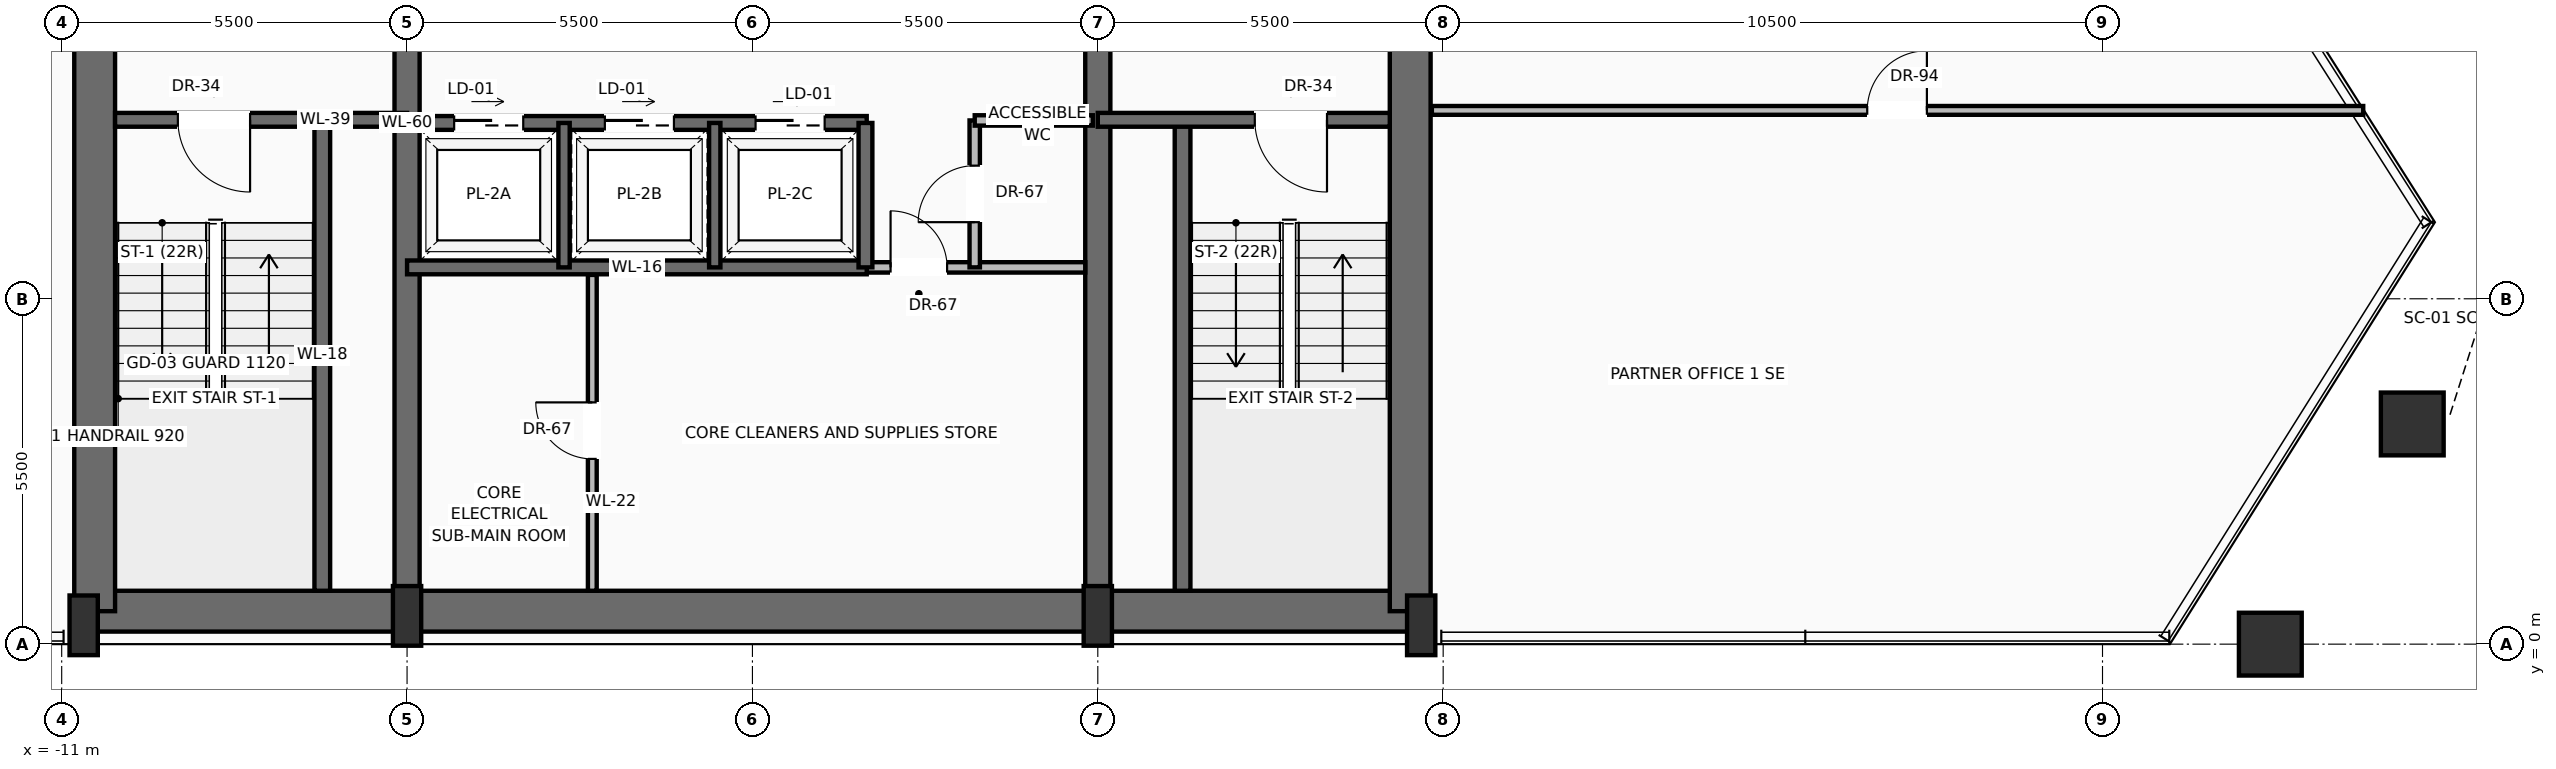
"""IFC4 building model, lengths in metres.
Left out: names, types, materials, properties, quantities, classifications, styles, units other than length and angle.
Written with IfcOpenShell. Run it as: python <this file> out.ifc"""

import sys

from ifc_helpers import new_model, si_unit, direction, frame, frame_2d, origin, origin_2d, place, context, subcontext, project, spatial, rectangle, hollow_rectangle, extrude, source, transform, mapped, element, fill, save


model = new_model("IFC4")
c1 = context("Model", 3, precision=1e-05, world=origin(), true_north=direction((0.0, 1.0)))
c2 = subcontext(c1, "Body", "Model", "MODEL_VIEW")
j1 = project(units=[si_unit("LENGTHUNIT", "METRE"), si_unit("PLANEANGLEUNIT", "RADIAN")], contexts=[c1])
p1 = place(None, origin())
s1 = spatial("IfcSite", under=j1, at=p1, CompositionType="ELEMENT")
p2 = place(p1, origin())
s2 = spatial("IfcBuilding", under=s1, at=p2, CompositionType="ELEMENT")
p3 = place(p2, frame((0.0, 0.0, 174.7)))
s3 = spatial("IfcBuildingStorey", under=s2, at=p3, CompositionType="ELEMENT", Elevation=174.7)
p4 = place(p3, frame((-10.65, 0.525, 0.0), z_axis=(0.0, 0.0, 1.0), x_axis=(1.0, 0.0, 0.0)))
e1 = element("IfcWall", 1, at=p4, inside=s3, PredefinedType="SHEAR", context=c2, shape_type="SweptSolid", body=[
    extrude(rectangle(XDim=21.3, YDim=0.65, at=frame_2d((10.65, 0.0))), origin(), (0.0, 0.0, 1.0), 3.47),
])
for number, where, z_axis, x_axis in (
    (2, (-10.475, 0.525, 0.0), (0.0, 0.0, 1.0), (0.0, 1.0, 0.0)),
    (3, (10.475, 0.525, 0.0), (0.0, 0.0, 1.0), (0.0, 1.0, 0.0)),
):
    element("IfcWall", number, at=place(p3, frame(where, z_axis=z_axis, x_axis=x_axis)), inside=s3, PredefinedType="SHEAR", context=c2, shape_type="SweptSolid", body=[
        extrude(rectangle(XDim=15.55, YDim=0.65, at=frame_2d((7.775, 0.0))), origin(), (0.0, 0.0, 1.0), 3.47),
    ])
p5 = place(p3, frame((-5.5, 0.525, 0.0), z_axis=(0.0, 0.0, 1.0), x_axis=(0.0, 1.0, 0.0)))
e4 = element("IfcWall", 4, at=p5, inside=s3, PredefinedType="SHEAR", context=c2, shape_type="SweptSolid", body=[
    extrude(rectangle(XDim=15.55, YDim=0.4, at=frame_2d((7.775, 0.0))), origin(), (0.0, 0.0, 1.0), 3.47),
])
p6 = place(p5, frame((8.975, 0.0, 0.0)))
e5 = element("IfcOpeningElement", 5, at=p6, cuts=e4, PredefinedType="OPENING", context=c2, shape_type="SweptSolid", body=[
    extrude(rectangle(XDim=1.1, YDim=2.2, at=frame_2d((0.55, 1.1))), frame((0.0, 0.21, 0.0), z_axis=(0.0, -1.0, 0.0), x_axis=(1.0, 0.0, 0.0)), (0.0, 0.0, 1.0), 0.42),
])
p7 = place(p3, frame((5.5, 0.525, 0.0), z_axis=(0.0, 0.0, 1.0), x_axis=(0.0, 1.0, 0.0)))
e6 = element("IfcWall", 6, at=p7, inside=s3, PredefinedType="SHEAR", context=c2, shape_type="SweptSolid", body=[
    extrude(rectangle(XDim=15.55, YDim=0.4, at=frame_2d((7.775, 0.0))), origin(), (0.0, 0.0, 1.0), 3.47),
])
p8 = place(p7, frame((8.975, 0.0, 0.0)))
e7 = element("IfcOpeningElement", 7, at=p8, cuts=e6, PredefinedType="OPENING", context=c2, shape_type="SweptSolid", body=[
    extrude(rectangle(XDim=1.1, YDim=2.2, at=frame_2d((0.55, 1.1))), frame((0.0, 0.21, 0.0), z_axis=(0.0, -1.0, 0.0), x_axis=(1.0, 0.0, 0.0)), (0.0, 0.0, 1.0), 0.42),
])
m1 = source(origin(), c2, "Body", "SweptSolid", [
    extrude(rectangle(XDim=0.45, YDim=0.95, at=origin_2d()), origin(), (0.0, 0.0, 1.0), 3.7),
])
for number, where, z_axis, x_axis in (
    (8, (-10.65, 0.3, 0.0), (0.0, 0.0, 1.0), (1.0, 0.0, 0.0)),
    (9, (-5.5, 0.45, 0.0), (0.0, 0.0, 1.0), (1.0, 0.0, 0.0)),
    (10, (5.5, 0.45, 0.0), (0.0, 0.0, 1.0), (1.0, 0.0, 0.0)),
    (11, (10.65, 0.3, 0.0), (0.0, 0.0, 1.0), (1.0, 0.0, 0.0)),
):
    element("IfcColumn", number, at=place(p3, frame(where, z_axis=z_axis, x_axis=x_axis)), inside=s3, PredefinedType="PILASTER", context=c2, shape_type="MappedRepresentation", body=[
        mapped(m1, transform((0.0, 0.0, 0.0), scale=1.0)),
    ])
m2 = source(origin(), c2, "Body", "SweptSolid", [
    extrude(hollow_rectangle(XDim=1.0, YDim=1.0, WallThickness=0.05, at=origin_2d()), origin(), (0.0, 0.0, 1.0), 3.691),
])
p9 = place(p3, frame((24.172, 0.0, 0.004), z_axis=(0.006151084107, 0.0, 0.999981081903), x_axis=(0.0, 1.0, 0.0)))
e12 = element("IfcColumn", 12, at=p9, inside=s3, PredefinedType="COLUMN", context=c2, shape_type="MappedRepresentation", body=[
    mapped(m2, transform((0.0, 0.0, 0.0), scale=1.0)),
])
m3 = source(origin(), c2, "Body", "SweptSolid", [
    extrude(hollow_rectangle(XDim=1.0, YDim=1.0, WallThickness=0.05, at=origin_2d()), origin(), (0.0, 0.0, 1.0), 3.692),
])
p10 = place(p3, frame((26.433, 3.507, 0.004), z_axis=(-0.005555227606, -0.014813940284, 0.999874835477), x_axis=(0.936329177569, -0.351123441588, 0.0)))
e13 = element("IfcColumn", 13, at=p10, inside=s3, PredefinedType="COLUMN", context=c2, shape_type="MappedRepresentation", body=[
    mapped(m3, transform((0.0, 0.0, 0.0), scale=1.0)),
])
p11 = place(p3, frame((-6.85, 0.85, 0.0), z_axis=(0.0, 0.0, 1.0), x_axis=(0.0, 1.0, 0.0)))
e14 = element("IfcWall", 14, at=p11, inside=s3, PredefinedType="SOLIDWALL", context=c2, shape_type="SweptSolid", body=[
    extrude(rectangle(XDim=7.5, YDim=0.25, at=frame_2d((3.75, 0.0))), origin(), (0.0, 0.0, 1.0), 3.47),
])
p12 = place(p3, frame((-5.5, 8.35, 0.0), z_axis=(0.0, 0.0, 1.0), x_axis=(-1.0, 0.0, 0.0)))
e15 = element("IfcWall", 15, at=p12, inside=s3, PredefinedType="SOLIDWALL", context=c2, shape_type="SweptSolid", body=[
    extrude(rectangle(XDim=4.65, YDim=0.22, at=frame_2d((2.325, 0.0))), origin(), (0.0, 0.0, 1.0), 3.47),
])
p13 = place(p12, frame((2.5, 0.0, 0.0)))
e16 = element("IfcOpeningElement", 16, at=p13, cuts=e15, PredefinedType="OPENING", context=c2, shape_type="SweptSolid", body=[
    extrude(rectangle(XDim=1.15, YDim=2.2, at=frame_2d((0.575, 1.1))), frame((0.0, 0.12, 0.0), z_axis=(0.0, -1.0, 0.0), x_axis=(1.0, 0.0, 0.0)), (0.0, 0.0, 1.0), 0.24),
])
p14 = place(p3, frame((6.85, 0.85, 0.0), z_axis=(0.0, 0.0, 1.0), x_axis=(0.0, 1.0, 0.0)))
e17 = element("IfcWall", 17, at=p14, inside=s3, PredefinedType="SOLIDWALL", context=c2, shape_type="SweptSolid", body=[
    extrude(rectangle(XDim=7.5, YDim=0.25, at=frame_2d((3.75, 0.0))), origin(), (0.0, 0.0, 1.0), 3.47),
])
p15 = place(p3, frame((10.15, 8.35, 0.0), z_axis=(0.0, 0.0, 1.0), x_axis=(-1.0, 0.0, 0.0)))
e18 = element("IfcWall", 18, at=p15, inside=s3, PredefinedType="SOLIDWALL", context=c2, shape_type="SweptSolid", body=[
    extrude(rectangle(XDim=4.65, YDim=0.22, at=frame_2d((2.325, 0.0))), origin(), (0.0, 0.0, 1.0), 3.47),
])
p16 = place(p15, frame((1.0, 0.0, 0.0)))
e19 = element("IfcOpeningElement", 19, at=p16, cuts=e18, PredefinedType="OPENING", context=c2, shape_type="SweptSolid", body=[
    extrude(rectangle(XDim=1.15, YDim=2.2, at=frame_2d((0.575, 1.1))), frame((0.0, 0.12, 0.0), z_axis=(0.0, -1.0, 0.0), x_axis=(1.0, 0.0, 0.0)), (0.0, 0.0, 1.0), 0.24),
])
p17 = place(p3, frame((1.82, 6.0, 0.0), z_axis=(0.0, 0.0, 1.0), x_axis=(1.0, 0.0, 0.0)))
e20 = element("IfcWall", 20, at=p17, inside=s3, PredefinedType="PARTITIONING", context=c2, shape_type="SweptSolid", body=[
    extrude(rectangle(XDim=3.48, YDim=0.165, at=frame_2d((1.74, 0.0))), origin(), (0.0, 0.0, 1.0), 3.462),
])
p18 = place(p17, frame((0.38, 0.0, 0.0)))
e21 = element("IfcOpeningElement", 21, at=p18, cuts=e20, PredefinedType="OPENING", context=c2, shape_type="SweptSolid", body=[
    extrude(rectangle(XDim=0.9, YDim=2.1, at=frame_2d((0.45, 1.05))), frame((0.0, 0.093, 0.0), z_axis=(0.0, -1.0, 0.0), x_axis=(1.0, 0.0, 0.0)), (0.0, 0.0, 1.0), 0.185),
])
p19 = place(p3, frame((-2.55, 0.85, 0.0), z_axis=(0.0, 0.0, 1.0), x_axis=(0.0, 1.0, 0.0)))
e22 = element("IfcWall", 22, at=p19, inside=s3, PredefinedType="PARTITIONING", context=c2, shape_type="SweptSolid", body=[
    extrude(rectangle(XDim=5.03, YDim=0.14, at=frame_2d((2.515, 0.0))), origin(), (0.0, 0.0, 1.0), 3.462),
])
p20 = place(p19, frame((2.1, 0.0, 0.0)))
e23 = element("IfcOpeningElement", 23, at=p20, cuts=e22, PredefinedType="OPENING", context=c2, shape_type="SweptSolid", body=[
    extrude(rectangle(XDim=0.9, YDim=2.1, at=frame_2d((0.45, 1.05))), frame((0.0, 0.08, 0.0), z_axis=(0.0, -1.0, 0.0), x_axis=(1.0, 0.0, 0.0)), (0.0, 0.0, 1.0), 0.16),
])
p21 = place(p3, frame((3.54, 6.0, 0.0), z_axis=(0.0, 0.0, 1.0), x_axis=(0.0, 1.0, 0.0)))
e24 = element("IfcWall", 24, at=p21, inside=s3, PredefinedType="PARTITIONING", context=c2, shape_type="SweptSolid", body=[
    extrude(rectangle(XDim=2.34, YDim=0.165, at=frame_2d((1.17, 0.0))), origin(), (0.0, 0.0, 1.0), 3.462),
])
p22 = place(p21, frame((0.72, 0.0, 0.0)))
e25 = element("IfcOpeningElement", 25, at=p22, cuts=e24, PredefinedType="OPENING", context=c2, shape_type="SweptSolid", body=[
    extrude(rectangle(XDim=0.9, YDim=2.1, at=frame_2d((0.45, 1.05))), frame((0.0, 0.093, 0.0), z_axis=(0.0, -1.0, 0.0), x_axis=(1.0, 0.0, 0.0)), (0.0, 0.0, 1.0), 0.185),
])
p23 = place(p3, frame((3.54, 8.34, 0.0), z_axis=(0.0, 0.0, 1.0), x_axis=(1.0, 0.0, 0.0)))
e26 = element("IfcWall", 26, at=p23, inside=s3, PredefinedType="PARTITIONING", context=c2, shape_type="SweptSolid", body=[
    extrude(rectangle(XDim=1.88, YDim=0.165, at=frame_2d((0.94, 0.0))), origin(), (0.0, 0.0, 1.0), 3.462),
])
p24 = place(p3, frame((-5.5, 6.0, 0.0), z_axis=(0.0, 0.0, 1.0), x_axis=(1.0, 0.0, 0.0)))
e27 = element("IfcWall", 27, at=p24, inside=s3, PredefinedType="SOLIDWALL", context=c2, shape_type="SweptSolid", body=[
    extrude(rectangle(XDim=7.32, YDim=0.22, at=frame_2d((3.66, 0.0))), origin(), (0.0, 0.0, 1.0), 3.47),
])
p25 = place(p3, frame((-5.5, 8.3, 0.0), z_axis=(0.0, 0.0, 1.0), x_axis=(1.0, 0.0, 0.0)))
e28 = element("IfcWall", 28, at=p25, inside=s3, PredefinedType="SOLIDWALL", context=c2, shape_type="SweptSolid", body=[
    extrude(rectangle(XDim=7.32, YDim=0.22, at=frame_2d((3.66, 0.0))), origin(), (0.0, 0.0, 1.0), 3.47),
])
p26 = place(p25, frame((0.75, 0.0, 0.0)))
e29 = element("IfcOpeningElement", 29, at=p26, cuts=e28, PredefinedType="OPENING", context=c2, shape_type="SweptSolid", body=[
    extrude(rectangle(XDim=1.1, YDim=2.2, at=frame_2d((0.55, 1.1))), frame((0.0, 0.12, 0.0), z_axis=(0.0, -1.0, 0.0), x_axis=(1.0, 0.0, 0.0)), (0.0, 0.0, 1.0), 0.24),
])
p27 = place(p25, frame((3.15, 0.0, 0.0)))
e30 = element("IfcOpeningElement", 30, at=p27, cuts=e28, PredefinedType="OPENING", context=c2, shape_type="SweptSolid", body=[
    extrude(rectangle(XDim=1.1, YDim=2.2, at=frame_2d((0.55, 1.1))), frame((0.0, 0.12, 0.0), z_axis=(0.0, -1.0, 0.0), x_axis=(1.0, 0.0, 0.0)), (0.0, 0.0, 1.0), 0.24),
])
p28 = place(p25, frame((5.55, 0.0, 0.0)))
e31 = element("IfcOpeningElement", 31, at=p28, cuts=e28, PredefinedType="OPENING", context=c2, shape_type="SweptSolid", body=[
    extrude(rectangle(XDim=1.1, YDim=2.2, at=frame_2d((0.55, 1.1))), frame((0.0, 0.12, 0.0), z_axis=(0.0, -1.0, 0.0), x_axis=(1.0, 0.0, 0.0)), (0.0, 0.0, 1.0), 0.24),
])
p29 = place(p3, frame((1.8, 6.0, 0.0), z_axis=(0.0, 0.0, 1.0), x_axis=(0.0, 1.0, 0.0)))
e32 = element("IfcWall", 32, at=p29, inside=s3, PredefinedType="SOLIDWALL", context=c2, shape_type="SweptSolid", body=[
    extrude(rectangle(XDim=2.3, YDim=0.22, at=frame_2d((1.15, 0.0))), origin(), (0.0, 0.0, 1.0), 3.47),
])
for number, where, z_axis, x_axis in (
    (33, (-3.0, 6.0, 0.0), (0.0, 0.0, 1.0), (0.0, 1.0, 0.0)),
    (34, (-0.6, 6.0, 0.0), (0.0, 0.0, 1.0), (0.0, 1.0, 0.0)),
):
    element("IfcWall", number, at=place(p3, frame(where, z_axis=z_axis, x_axis=x_axis)), inside=s3, PredefinedType="SOLIDWALL", context=c2, shape_type="SweptSolid", body=[
        extrude(rectangle(XDim=2.3, YDim=0.18, at=frame_2d((1.15, 0.0))), origin(), (0.0, 0.0, 1.0), 3.47),
    ])
p30 = place(p3, frame((10.82, 8.5, 0.0), z_axis=(0.0, 0.0, 1.0), x_axis=(1.0, 0.0, 0.0)))
e35 = element("IfcWall", 35, at=p30, inside=s3, PredefinedType="PARTITIONING", context=c2, shape_type="SweptSolid", body=[
    extrude(rectangle(XDim=14.832, YDim=0.14, at=frame_2d((7.416, 0.0))), origin(), (0.0, 0.0, 1.0), 3.462),
])
p31 = place(p30, frame((6.933, 0.0, 0.0)))
e36 = element("IfcOpeningElement", 36, at=p31, cuts=e35, PredefinedType="OPENING", context=c2, shape_type="SweptSolid", body=[
    extrude(rectangle(XDim=0.95, YDim=2.2, at=frame_2d((0.475, 1.1))), frame((0.0, 0.08, 0.0), z_axis=(0.0, -1.0, 0.0), x_axis=(1.0, 0.0, 0.0)), (0.0, 0.0, 1.0), 0.16),
])
m4 = source(origin(), c2, "Body", "SweptSolid", [
    extrude(rectangle(XDim=1.15, YDim=2.2, at=frame_2d((0.575, 1.1))), frame((0.0, 0.025, 0.0), z_axis=(0.0, -1.0, 0.0), x_axis=(1.0, 0.0, 0.0)), (0.0, 0.0, 1.0), 0.05),
])
p32 = place(p13, origin())
e37 = element("IfcDoor", 37, at=p32, inside=s3, OperationType="SINGLE_SWING_LEFT", PredefinedType="DOOR", context=c2, shape_type="MappedRepresentation", body=[
    mapped(m4, transform((0.0, 0.0, 0.0), scale=1.0)),
])
fill(e16, e37)
p33 = place(p16, origin())
e38 = element("IfcDoor", 38, at=p33, inside=s3, OperationType="SINGLE_SWING_LEFT", PredefinedType="DOOR", context=c2, shape_type="MappedRepresentation", body=[
    mapped(m4, transform((0.0, 0.0, 0.0), scale=1.0)),
])
fill(e19, e38)
m5 = source(origin(), c2, "Body", "SweptSolid", [
    extrude(rectangle(XDim=0.9, YDim=2.1, at=frame_2d((0.45, 1.05))), frame((0.0, 0.025, 0.0), z_axis=(0.0, -1.0, 0.0), x_axis=(1.0, 0.0, 0.0)), (0.0, 0.0, 1.0), 0.05),
])
p34 = place(p18, origin())
e39 = element("IfcDoor", 39, at=p34, inside=s3, OperationType="SINGLE_SWING_LEFT", PredefinedType="DOOR", context=c2, shape_type="MappedRepresentation", body=[
    mapped(m5, transform((0.0, 0.0, 0.0), scale=1.0)),
])
fill(e21, e39)
p35 = place(p20, origin())
e40 = element("IfcDoor", 40, at=p35, inside=s3, OperationType="SINGLE_SWING_RIGHT", PredefinedType="DOOR", context=c2, shape_type="MappedRepresentation", body=[
    mapped(m5, transform((0.0, 0.0, 0.0), scale=1.0)),
])
fill(e23, e40)
p36 = place(p22, origin())
e41 = element("IfcDoor", 41, at=p36, inside=s3, OperationType="SINGLE_SWING_LEFT", PredefinedType="DOOR", context=c2, shape_type="MappedRepresentation", body=[
    mapped(m5, transform((0.0, 0.0, 0.0), scale=1.0)),
])
fill(e25, e41)
m6 = source(origin(), c2, "Body", "SweptSolid", [
    extrude(rectangle(XDim=1.1, YDim=2.2, at=frame_2d((0.55, 1.1))), frame((0.0, 0.025, 0.0), z_axis=(0.0, -1.0, 0.0), x_axis=(1.0, 0.0, 0.0)), (0.0, 0.0, 1.0), 0.05),
])
p37 = place(p26, origin())
e42 = element("IfcDoor", 42, at=p37, inside=s3, OperationType="SLIDING_TO_LEFT", PredefinedType="DOOR", context=c2, shape_type="MappedRepresentation", body=[
    mapped(m6, transform((0.0, 0.0, 0.0), scale=1.0)),
])
fill(e29, e42)
p38 = place(p27, origin())
e43 = element("IfcDoor", 43, at=p38, inside=s3, OperationType="SLIDING_TO_LEFT", PredefinedType="DOOR", context=c2, shape_type="MappedRepresentation", body=[
    mapped(m6, transform((0.0, 0.0, 0.0), scale=1.0)),
])
fill(e30, e43)
p39 = place(p28, origin())
e44 = element("IfcDoor", 44, at=p39, inside=s3, OperationType="SLIDING_TO_LEFT", PredefinedType="DOOR", context=c2, shape_type="MappedRepresentation", body=[
    mapped(m6, transform((0.0, 0.0, 0.0), scale=1.0)),
])
fill(e31, e44)
m7 = source(origin(), c2, "Body", "SweptSolid", [
    extrude(rectangle(XDim=0.95, YDim=2.2, at=frame_2d((0.475, 1.1))), frame((0.0, 0.025, 0.0), z_axis=(0.0, -1.0, 0.0), x_axis=(1.0, 0.0, 0.0)), (0.0, 0.0, 1.0), 0.05),
])
p40 = place(p31, origin())
e45 = element("IfcDoor", 45, at=p40, inside=s3, OperationType="SINGLE_SWING_RIGHT", PredefinedType="DOOR", context=c2, shape_type="MappedRepresentation", body=[
    mapped(m7, transform((0.0, 0.0, 0.0), scale=1.0)),
])
fill(e36, e45)
save(model, sys.argv[1])
